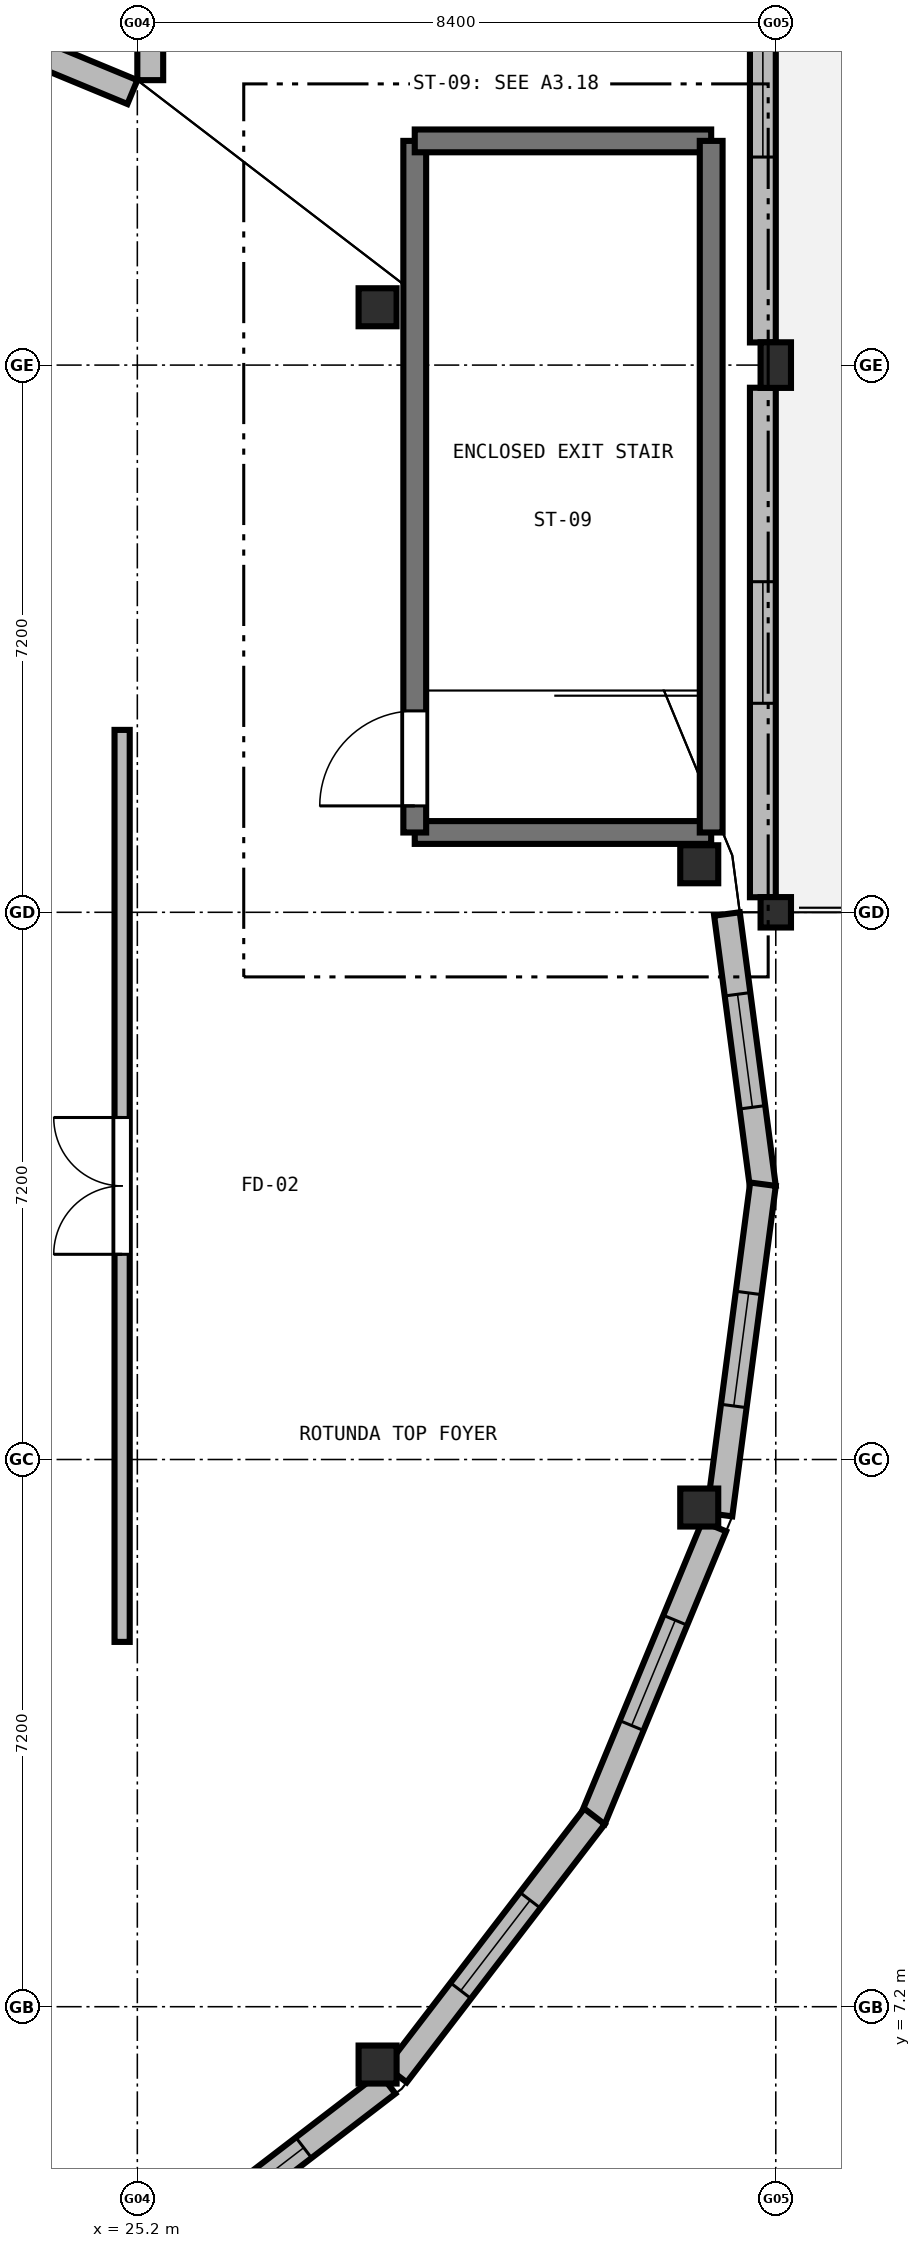
"""IFC4 building model, lengths in metres.
Left out: names, types, materials, properties, quantities, classifications, styles, units other than length and angle.
Written with IfcOpenShell. Run it as: python <this file> out.ifc"""

import sys

from ifc_helpers import new_model, si_unit, direction, frame, frame_2d, origin, origin_2d, place, context, subcontext, project, spatial, rectangle, circle, extrude, element, fill, save


model = new_model("IFC4")
c1 = context("Model", 3, precision=1e-05, world=origin(), true_north=direction((0.0, 1.0)))
c2 = subcontext(c1, "Body", "Model", "MODEL_VIEW")
j1 = project(units=[si_unit("LENGTHUNIT", "METRE"), si_unit("PLANEANGLEUNIT", "RADIAN")], contexts=[c1])
p1 = place(None, origin())
s1 = spatial("IfcSite", under=j1, at=p1, CompositionType="ELEMENT")
p2 = place(p1, origin())
s2 = spatial("IfcBuilding", under=s1, at=p2, CompositionType="ELEMENT")
p3 = place(p2, frame((0.0, 0.0, 9.3)))
s3 = spatial("IfcBuildingStorey", under=s2, at=p3, CompositionType="ELEMENT", Elevation=9.3)
for number, where, z_axis, x_axis in (
    (1, (28.361, 6.439, 0.0), (0.0, 0.0, 1.0), (1.0, 0.0, 0.0)),
    (2, (28.361, 29.561, 0.0), (0.0, 0.0, 1.0), (1.0, 0.0, 0.0)),
    (3, (32.593, 13.768, 0.0), (0.0, 0.0, 1.0), (1.0, 0.0, 0.0)),
    (4, (32.593, 22.232, 0.0), (0.0, 0.0, 1.0), (1.0, 0.0, 0.0)),
):
    element("IfcColumn", number, at=place(p3, frame(where, z_axis=z_axis, x_axis=x_axis)), inside=s3, PredefinedType="COLUMN", context=c2, shape_type="SweptSolid", body=[
        extrude(circle(Radius=0.25, at=origin_2d()), origin(), (0.0, 0.0, 1.0), 4.32),
    ])
p4 = place(p3, frame((33.6, 21.6, 0.0), z_axis=(0.0, 0.0, 1.0), x_axis=(1.0, 0.0, 0.0)))
e5 = element("IfcColumn", 5, at=p4, inside=s3, PredefinedType="COLUMN", context=c2, shape_type="SweptSolid", body=[
    extrude(rectangle(XDim=0.4, YDim=0.4, at=origin_2d()), origin(), (0.0, 0.0, 1.0), 4.2),
])
p5 = place(p3, frame((33.6, 28.8, 0.0), z_axis=(0.0, 0.0, 1.0), x_axis=(1.0, 0.0, 0.0)))
e6 = element("IfcColumn", 6, at=p5, inside=s3, PredefinedType="COLUMN", context=c2, shape_type="SweptSolid", body=[
    extrude(rectangle(XDim=0.4, YDim=0.6, at=origin_2d()), origin(), (0.0, 0.0, 1.0), 4.2),
])
p6 = place(p3, frame((32.789, 13.52, 0.0), z_axis=(0.0, 0.0, 1.0), x_axis=(-0.382711791263, -0.923867785361, 0.0)))
e7 = element("IfcWall", 7, at=p6, inside=s3, PredefinedType="SOLIDWALL", context=c2, shape_type="SweptSolid", body=[
    extrude(rectangle(XDim=4.173, YDim=0.34, at=frame_2d((2.086, 0.0))), origin(), (0.0, 0.0, 1.0), 3.0),
])
p7 = place(p6, frame((1.336, 0.0, 1.0)))
e8 = element("IfcOpeningElement", 8, at=p7, cuts=e7, PredefinedType="OPENING", context=c2, shape_type="SweptSolid", body=[
    extrude(rectangle(XDim=1.5, YDim=1.5, at=frame_2d((0.75, 0.75))), frame((0.0, 0.18, 0.0), z_axis=(0.0, -1.0, 0.0), x_axis=(1.0, 0.0, 0.0)), (0.0, 0.0, 1.0), 0.36),
])
p8 = place(p3, frame((31.214, 9.704, 0.0), z_axis=(0.0, 0.0, 1.0), x_axis=(-0.608762012481, -0.793352892577, 0.0)))
e9 = element("IfcWall", 9, at=p8, inside=s3, PredefinedType="SOLIDWALL", context=c2, shape_type="SweptSolid", body=[
    extrude(rectangle(XDim=4.28, YDim=0.34, at=frame_2d((2.14, 0.0))), origin(), (0.0, 0.0, 1.0), 3.0),
])
p9 = place(p8, frame((1.39, 0.0, 1.0)))
e10 = element("IfcOpeningElement", 10, at=p9, cuts=e9, PredefinedType="OPENING", context=c2, shape_type="SweptSolid", body=[
    extrude(rectangle(XDim=1.5, YDim=1.5, at=frame_2d((0.75, 0.75))), frame((0.0, 0.18, 0.0), z_axis=(0.0, -1.0, 0.0), x_axis=(1.0, 0.0, 0.0)), (0.0, 0.0, 1.0), 0.36),
])
p10 = place(p3, frame((28.492, 6.191, 0.0), z_axis=(0.0, 0.0, 1.0), x_axis=(-0.793380442346, -0.608726107296, 0.0)))
e11 = element("IfcWall", 11, at=p10, inside=s3, PredefinedType="SOLIDWALL", context=c2, shape_type="SweptSolid", body=[
    extrude(rectangle(XDim=4.28, YDim=0.34, at=frame_2d((2.14, 0.0))), origin(), (0.0, 0.0, 1.0), 3.0),
])
p11 = place(p10, frame((1.39, 0.0, 1.0)))
e12 = element("IfcOpeningElement", 12, at=p11, cuts=e11, PredefinedType="OPENING", context=c2, shape_type="SweptSolid", body=[
    extrude(rectangle(XDim=1.5, YDim=1.5, at=frame_2d((0.75, 0.75))), frame((0.0, 0.18, 0.0), z_axis=(0.0, -1.0, 0.0), x_axis=(1.0, 0.0, 0.0)), (0.0, 0.0, 1.0), 0.36),
])
p12 = place(p3, frame((21.28, 33.989, 0.0), z_axis=(0.0, 0.0, 1.0), x_axis=(0.923867785361, -0.382711791263, 0.0)))
e13 = element("IfcWall", 13, at=p12, inside=s3, PredefinedType="SOLIDWALL", context=c2, shape_type="SweptSolid", body=[
    extrude(rectangle(XDim=4.173, YDim=0.34, at=frame_2d((2.086, 0.0))), origin(), (0.0, 0.0, 1.0), 3.0),
])
p13 = place(p12, frame((1.336, 0.0, 1.0)))
e14 = element("IfcOpeningElement", 14, at=p13, cuts=e13, PredefinedType="OPENING", context=c2, shape_type="SweptSolid", body=[
    extrude(rectangle(XDim=1.5, YDim=1.5, at=frame_2d((0.75, 0.75))), frame((0.0, 0.18, 0.0), z_axis=(0.0, -1.0, 0.0), x_axis=(1.0, 0.0, 0.0)), (0.0, 0.0, 1.0), 0.36),
])
p14 = place(p3, frame((25.37, 32.549, 0.0), z_axis=(0.0, 0.0, 1.0), x_axis=(0.0, 1.0, 0.0)))
e15 = element("IfcWall", 15, at=p14, inside=s3, PredefinedType="SOLIDWALL", context=c2, shape_type="SweptSolid", body=[
    extrude(rectangle(XDim=3.253, YDim=0.34, at=frame_2d((1.626, 0.0))), origin(), (0.0, 0.0, 1.0), 3.86),
])
p15 = place(p3, frame((33.43, 35.777, 0.0), z_axis=(0.0, 0.0, 1.0), x_axis=(0.0, -1.0, 0.0)))
e16 = element("IfcWall", 16, at=p15, inside=s3, PredefinedType="SOLIDWALL", context=c2, shape_type="SweptSolid", body=[
    extrude(rectangle(XDim=6.679, YDim=0.34, at=frame_2d((3.34, 0.0))), origin(), (0.0, 0.0, 1.0), 3.86),
])
p16 = place(p15, frame((2.439, 0.0, 0.95)))
e17 = element("IfcOpeningElement", 17, at=p16, cuts=e16, PredefinedType="OPENING", context=c2, shape_type="SweptSolid", body=[
    extrude(rectangle(XDim=1.8, YDim=2.0, at=frame_2d((0.9, 1.0))), frame((0.0, 0.18, 0.0), z_axis=(0.0, -1.0, 0.0), x_axis=(1.0, 0.0, 0.0)), (0.0, 0.0, 1.0), 0.36),
])
p17 = place(p3, frame((33.43, 28.502, 0.0), z_axis=(0.0, 0.0, 1.0), x_axis=(0.0, -1.0, 0.0)))
e18 = element("IfcWall", 18, at=p17, inside=s3, PredefinedType="SOLIDWALL", context=c2, shape_type="SweptSolid", body=[
    extrude(rectangle(XDim=6.704, YDim=0.34, at=frame_2d((3.352, 0.0))), origin(), (0.0, 0.0, 1.0), 3.86),
])
p18 = place(p17, frame((2.552, 0.0, 0.95)))
e19 = element("IfcOpeningElement", 19, at=p18, cuts=e18, PredefinedType="OPENING", context=c2, shape_type="SweptSolid", body=[
    extrude(rectangle(XDim=1.6, YDim=1.9, at=frame_2d((0.8, 0.95))), frame((0.0, 0.18, 0.0), z_axis=(0.0, -1.0, 0.0), x_axis=(1.0, 0.0, 0.0)), (0.0, 0.0, 1.0), 0.36),
])
p19 = place(p3, frame((32.958, 21.578, 0.0), z_axis=(0.0, 0.0, 1.0), x_axis=(0.130503210904, -0.991447886651, 0.0)))
e20 = element("IfcWall", 20, at=p19, inside=s3, PredefinedType="SOLIDWALL", context=c2, shape_type="SweptSolid", body=[
    extrude(rectangle(XDim=3.631, YDim=0.34, at=frame_2d((1.815, 0.0))), origin(), (0.0, 0.0, 1.0), 3.0),
])
p20 = place(p19, frame((1.065, 0.0, 1.0)))
e21 = element("IfcOpeningElement", 21, at=p20, cuts=e20, PredefinedType="OPENING", context=c2, shape_type="SweptSolid", body=[
    extrude(rectangle(XDim=1.5, YDim=1.5, at=frame_2d((0.75, 0.75))), frame((0.0, 0.18, 0.0), z_axis=(0.0, -1.0, 0.0), x_axis=(1.0, 0.0, 0.0)), (0.0, 0.0, 1.0), 0.36),
])
p21 = place(p3, frame((33.431, 18.022, 0.0), z_axis=(0.0, 0.0, 1.0), x_axis=(-0.130486192962, -0.991450126555, 0.0)))
e22 = element("IfcWall", 22, at=p21, inside=s3, PredefinedType="SOLIDWALL", context=c2, shape_type="SweptSolid", body=[
    extrude(rectangle(XDim=4.386, YDim=0.34, at=frame_2d((2.193, 0.0))), origin(), (0.0, 0.0, 1.0), 3.0),
])
p22 = place(p21, frame((1.443, 0.0, 1.0)))
e23 = element("IfcOpeningElement", 23, at=p22, cuts=e22, PredefinedType="OPENING", context=c2, shape_type="SweptSolid", body=[
    extrude(rectangle(XDim=1.5, YDim=1.5, at=frame_2d((0.75, 0.75))), frame((0.0, 0.18, 0.0), z_axis=(0.0, -1.0, 0.0), x_axis=(1.0, 0.0, 0.0)), (0.0, 0.0, 1.0), 0.36),
])
p23 = place(p3, frame((32.75, 22.65, 0.0), z_axis=(0.0, 0.0, 1.0), x_axis=(-1.0, 0.0, 0.0)))
e24 = element("IfcWall", 24, at=p23, inside=s3, PredefinedType="SHEAR", context=c2, shape_type="SweptSolid", body=[
    extrude(rectangle(XDim=3.9, YDim=0.3, at=frame_2d((1.95, 0.0))), origin(), (0.0, 0.0, 1.0), 3.94),
])
p24 = place(p3, frame((28.85, 22.65, 0.0), z_axis=(0.0, 0.0, 1.0), x_axis=(0.0, 1.0, 0.0)))
e25 = element("IfcWall", 25, at=p24, inside=s3, PredefinedType="SHEAR", context=c2, shape_type="SweptSolid", body=[
    extrude(rectangle(XDim=9.1, YDim=0.3, at=frame_2d((4.55, 0.0))), origin(), (0.0, 0.0, 1.0), 3.94),
])
p25 = place(p24, frame((0.35, 0.0, 0.0)))
e26 = element("IfcOpeningElement", 26, at=p25, cuts=e25, PredefinedType="OPENING", context=c2, shape_type="SweptSolid", body=[
    extrude(rectangle(XDim=1.25, YDim=2.2, at=frame_2d((0.625, 1.1))), frame((0.0, 0.16, 0.0), z_axis=(0.0, -1.0, 0.0), x_axis=(1.0, 0.0, 0.0)), (0.0, 0.0, 1.0), 0.32),
])
p26 = place(p3, frame((28.85, 31.75, 0.0), z_axis=(0.0, 0.0, 1.0), x_axis=(1.0, 0.0, 0.0)))
e27 = element("IfcWall", 27, at=p26, inside=s3, PredefinedType="SHEAR", context=c2, shape_type="SweptSolid", body=[
    extrude(rectangle(XDim=3.9, YDim=0.3, at=frame_2d((1.95, 0.0))), origin(), (0.0, 0.0, 1.0), 3.94),
])
p27 = place(p3, frame((32.75, 31.75, 0.0), z_axis=(0.0, 0.0, 1.0), x_axis=(0.0, -1.0, 0.0)))
e28 = element("IfcWall", 28, at=p27, inside=s3, PredefinedType="SHEAR", context=c2, shape_type="SweptSolid", body=[
    extrude(rectangle(XDim=9.1, YDim=0.3, at=frame_2d((4.55, 0.0))), origin(), (0.0, 0.0, 1.0), 3.94),
])
p28 = place(p3, frame((25.0, 12.0, 0.0), z_axis=(0.0, 0.0, 1.0), x_axis=(0.0, 1.0, 0.0)))
e29 = element("IfcWall", 29, at=p28, inside=s3, PredefinedType="SOLIDWALL", context=c2, shape_type="SweptSolid", body=[
    extrude(rectangle(XDim=12.0, YDim=0.2, at=frame_2d((6.0, 0.0))), origin(), (0.0, 0.0, 1.0), 3.85),
])
p29 = place(p28, frame((5.1, 0.0, 0.0)))
e30 = element("IfcOpeningElement", 30, at=p29, cuts=e29, PredefinedType="OPENING", context=c2, shape_type="SweptSolid", body=[
    extrude(rectangle(XDim=1.8, YDim=2.2, at=frame_2d((0.9, 1.1))), frame((0.0, 0.11, 0.0), z_axis=(0.0, -1.0, 0.0), x_axis=(1.0, 0.0, 0.0)), (0.0, 0.0, 1.0), 0.22),
])
p30 = place(p7, origin())
e31 = element("IfcWindow", 31, at=p30, inside=s3, PartitioningType="SINGLE_PANEL", PredefinedType="WINDOW", context=c2, shape_type="SweptSolid", body=[
    extrude(rectangle(XDim=1.5, YDim=1.5, at=frame_2d((0.75, 0.75))), frame((0.0, 0.03, 0.0), z_axis=(0.0, -1.0, 0.0), x_axis=(1.0, 0.0, 0.0)), (0.0, 0.0, 1.0), 0.06),
])
fill(e8, e31)
p31 = place(p9, origin())
e32 = element("IfcWindow", 32, at=p31, inside=s3, PartitioningType="SINGLE_PANEL", PredefinedType="WINDOW", context=c2, shape_type="SweptSolid", body=[
    extrude(rectangle(XDim=1.5, YDim=1.5, at=frame_2d((0.75, 0.75))), frame((0.0, 0.03, 0.0), z_axis=(0.0, -1.0, 0.0), x_axis=(1.0, 0.0, 0.0)), (0.0, 0.0, 1.0), 0.06),
])
fill(e10, e32)
p32 = place(p11, origin())
e33 = element("IfcWindow", 33, at=p32, inside=s3, PartitioningType="SINGLE_PANEL", PredefinedType="WINDOW", context=c2, shape_type="SweptSolid", body=[
    extrude(rectangle(XDim=1.5, YDim=1.5, at=frame_2d((0.75, 0.75))), frame((0.0, 0.03, 0.0), z_axis=(0.0, -1.0, 0.0), x_axis=(1.0, 0.0, 0.0)), (0.0, 0.0, 1.0), 0.06),
])
fill(e12, e33)
p33 = place(p16, origin())
e34 = element("IfcWindow", 34, at=p33, inside=s3, PartitioningType="SINGLE_PANEL", PredefinedType="WINDOW", context=c2, shape_type="SweptSolid", body=[
    extrude(rectangle(XDim=1.8, YDim=2.0, at=frame_2d((0.9, 1.0))), frame((0.0, 0.03, 0.0), z_axis=(0.0, -1.0, 0.0), x_axis=(1.0, 0.0, 0.0)), (0.0, 0.0, 1.0), 0.06),
])
fill(e17, e34)
p34 = place(p18, origin())
e35 = element("IfcWindow", 35, at=p34, inside=s3, PartitioningType="SINGLE_PANEL", PredefinedType="WINDOW", context=c2, shape_type="SweptSolid", body=[
    extrude(rectangle(XDim=1.6, YDim=1.9, at=frame_2d((0.8, 0.95))), frame((0.0, 0.03, 0.0), z_axis=(0.0, -1.0, 0.0), x_axis=(1.0, 0.0, 0.0)), (0.0, 0.0, 1.0), 0.06),
])
fill(e19, e35)
p35 = place(p20, origin())
e36 = element("IfcWindow", 36, at=p35, inside=s3, PartitioningType="SINGLE_PANEL", PredefinedType="WINDOW", context=c2, shape_type="SweptSolid", body=[
    extrude(rectangle(XDim=1.5, YDim=1.5, at=frame_2d((0.75, 0.75))), frame((0.0, 0.03, 0.0), z_axis=(0.0, -1.0, 0.0), x_axis=(1.0, 0.0, 0.0)), (0.0, 0.0, 1.0), 0.06),
])
fill(e21, e36)
p36 = place(p22, origin())
e37 = element("IfcWindow", 37, at=p36, inside=s3, PartitioningType="SINGLE_PANEL", PredefinedType="WINDOW", context=c2, shape_type="SweptSolid", body=[
    extrude(rectangle(XDim=1.5, YDim=1.5, at=frame_2d((0.75, 0.75))), frame((0.0, 0.03, 0.0), z_axis=(0.0, -1.0, 0.0), x_axis=(1.0, 0.0, 0.0)), (0.0, 0.0, 1.0), 0.06),
])
fill(e23, e37)
p37 = place(p25, origin())
e38 = element("IfcDoor", 38, at=p37, inside=s3, OperationType="SINGLE_SWING_LEFT", PredefinedType="DOOR", context=c2, shape_type="SweptSolid", body=[
    extrude(rectangle(XDim=1.25, YDim=2.2, at=frame_2d((0.625, 1.1))), frame((0.0, 0.025, 0.0), z_axis=(0.0, -1.0, 0.0), x_axis=(1.0, 0.0, 0.0)), (0.0, 0.0, 1.0), 0.05),
])
fill(e26, e38)
p38 = place(p29, origin())
e39 = element("IfcDoor", 39, at=p38, inside=s3, OperationType="DOUBLE_DOOR_SINGLE_SWING", PredefinedType="DOOR", context=c2, shape_type="SweptSolid", body=[
    extrude(rectangle(XDim=1.8, YDim=2.2, at=frame_2d((0.9, 1.1))), frame((0.0, 0.025, 0.0), z_axis=(0.0, -1.0, 0.0), x_axis=(1.0, 0.0, 0.0)), (0.0, 0.0, 1.0), 0.05),
])
fill(e30, e39)
save(model, sys.argv[1])
